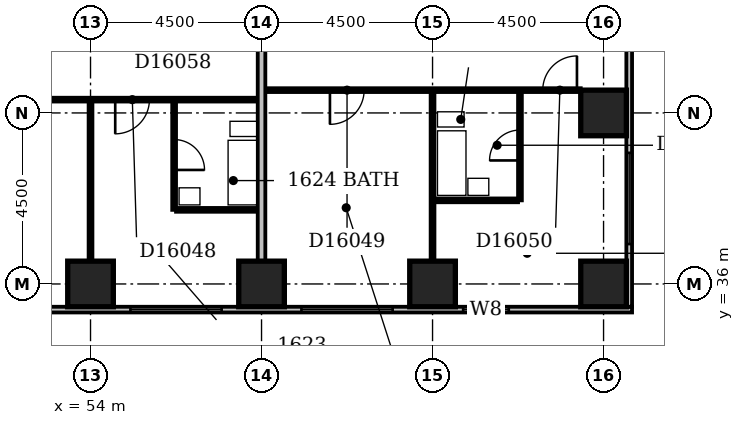
"""IFC4 building model, lengths in metres.
Left out: names, types, materials, properties, quantities, classifications, styles, units other than length and angle.
Written with IfcOpenShell. Run it as: python <this file> out.ifc"""

import sys

from ifc_helpers import new_model, si_unit, direction, frame, frame_2d, origin, origin_2d, place, context, subcontext, project, spatial, rectangle, extrude, element, fill, save


model = new_model("IFC4")
c1 = context("Model", 3, precision=1e-05, world=origin(), true_north=direction((0.0, 1.0)))
c2 = subcontext(c1, "Body", "Model", "MODEL_VIEW")
j1 = project(units=[si_unit("LENGTHUNIT", "METRE"), si_unit("PLANEANGLEUNIT", "RADIAN")], contexts=[c1])
p1 = place(None, origin())
s1 = spatial("IfcSite", under=j1, at=p1, CompositionType="ELEMENT")
p2 = place(p1, origin())
s2 = spatial("IfcBuilding", under=s1, at=p2, CompositionType="ELEMENT")
p3 = place(p2, frame((0.0, 0.0, 68.6)))
s3 = spatial("IfcBuildingStorey", under=s2, at=p3, CompositionType="ELEMENT", Elevation=68.6)
for number, where, z_axis, x_axis in (
    (1, (54.0, 36.0, -0.3), (0.0, 0.0, 1.0), (1.0, 0.0, 0.0)),
    (2, (58.5, 36.0, -0.3), (0.0, 0.0, 1.0), (1.0, 0.0, 0.0)),
    (3, (63.0, 36.0, -0.3), (0.0, 0.0, 1.0), (1.0, 0.0, 0.0)),
    (4, (67.5, 36.0, -0.3), (0.0, 0.0, 1.0), (1.0, 0.0, 0.0)),
    (5, (67.5, 40.5, -0.3), (0.0, 0.0, 1.0), (1.0, 0.0, 0.0)),
):
    element("IfcColumn", number, at=place(p3, frame(where, z_axis=z_axis, x_axis=x_axis)), inside=s3, PredefinedType="COLUMN", context=c2, shape_type="SweptSolid", body=[
        extrude(rectangle(XDim=1.2, YDim=1.2, at=origin_2d()), origin(), (0.0, 0.0, 1.0), 3.6),
    ])
p4 = place(p3, frame((23.1, 35.325, 0.0), z_axis=(0.0, 0.0, 1.0), x_axis=(1.0, 0.0, 0.0)))
e6 = element("IfcWall", 6, at=p4, inside=s3, PredefinedType="STANDARD", context=c2, shape_type="SweptSolid", body=[
    extrude(rectangle(XDim=45.15, YDim=0.15, at=frame_2d((22.575, 0.0))), origin(), (0.0, 0.0, 1.0), 2.7),
])
p5 = place(p4, frame((0.45, 0.0, 0.6)))
e7 = element("IfcOpeningElement", 7, at=p5, cuts=e6, PredefinedType="OPENING", context=c2, shape_type="SweptSolid", body=[
    extrude(rectangle(XDim=2.4, YDim=1.8, at=frame_2d((1.2, 0.9))), frame((0.0, 0.087, 0.0), z_axis=(0.0, -1.0, 0.0), x_axis=(1.0, 0.0, 0.0)), (0.0, 0.0, 1.0), 0.174),
])
p6 = place(p4, frame((4.95, 0.0, 0.6)))
e8 = element("IfcOpeningElement", 8, at=p6, cuts=e6, PredefinedType="OPENING", context=c2, shape_type="SweptSolid", body=[
    extrude(rectangle(XDim=2.4, YDim=1.8, at=frame_2d((1.2, 0.9))), frame((0.0, 0.087, 0.0), z_axis=(0.0, -1.0, 0.0), x_axis=(1.0, 0.0, 0.0)), (0.0, 0.0, 1.0), 0.174),
])
p7 = place(p4, frame((9.243, 0.0, 0.6)))
e9 = element("IfcOpeningElement", 9, at=p7, cuts=e6, PredefinedType="OPENING", context=c2, shape_type="SweptSolid", body=[
    extrude(rectangle(XDim=1.8, YDim=1.8, at=frame_2d((0.9, 0.9))), frame((0.0, 0.087, 0.0), z_axis=(0.0, -1.0, 0.0), x_axis=(1.0, 0.0, 0.0)), (0.0, 0.0, 1.0), 0.174),
])
p8 = place(p4, frame((14.97, 0.0, 0.6)))
e10 = element("IfcOpeningElement", 10, at=p8, cuts=e6, PredefinedType="OPENING", context=c2, shape_type="SweptSolid", body=[
    extrude(rectangle(XDim=1.5, YDim=1.8, at=frame_2d((0.75, 0.9))), frame((0.0, 0.087, 0.0), z_axis=(0.0, -1.0, 0.0), x_axis=(1.0, 0.0, 0.0)), (0.0, 0.0, 1.0), 0.174),
])
p9 = place(p4, frame((18.45, 0.0, 0.6)))
e11 = element("IfcOpeningElement", 11, at=p9, cuts=e6, PredefinedType="OPENING", context=c2, shape_type="SweptSolid", body=[
    extrude(rectangle(XDim=2.4, YDim=1.8, at=frame_2d((1.2, 0.9))), frame((0.0, 0.087, 0.0), z_axis=(0.0, -1.0, 0.0), x_axis=(1.0, 0.0, 0.0)), (0.0, 0.0, 1.0), 0.174),
])
p10 = place(p4, frame((22.95, 0.0, 0.6)))
e12 = element("IfcOpeningElement", 12, at=p10, cuts=e6, PredefinedType="OPENING", context=c2, shape_type="SweptSolid", body=[
    extrude(rectangle(XDim=2.4, YDim=1.8, at=frame_2d((1.2, 0.9))), frame((0.0, 0.087, 0.0), z_axis=(0.0, -1.0, 0.0), x_axis=(1.0, 0.0, 0.0)), (0.0, 0.0, 1.0), 0.174),
])
p11 = place(p4, frame((27.45, 0.0, 0.6)))
e13 = element("IfcOpeningElement", 13, at=p11, cuts=e6, PredefinedType="OPENING", context=c2, shape_type="SweptSolid", body=[
    extrude(rectangle(XDim=2.4, YDim=1.8, at=frame_2d((1.2, 0.9))), frame((0.0, 0.087, 0.0), z_axis=(0.0, -1.0, 0.0), x_axis=(1.0, 0.0, 0.0)), (0.0, 0.0, 1.0), 0.174),
])
p12 = place(p4, frame((31.95, 0.0, 0.6)))
e14 = element("IfcOpeningElement", 14, at=p12, cuts=e6, PredefinedType="OPENING", context=c2, shape_type="SweptSolid", body=[
    extrude(rectangle(XDim=2.4, YDim=1.8, at=frame_2d((1.2, 0.9))), frame((0.0, 0.087, 0.0), z_axis=(0.0, -1.0, 0.0), x_axis=(1.0, 0.0, 0.0)), (0.0, 0.0, 1.0), 0.174),
])
p13 = place(p4, frame((36.45, 0.0, 0.6)))
e15 = element("IfcOpeningElement", 15, at=p13, cuts=e6, PredefinedType="OPENING", context=c2, shape_type="SweptSolid", body=[
    extrude(rectangle(XDim=2.4, YDim=1.8, at=frame_2d((1.2, 0.9))), frame((0.0, 0.087, 0.0), z_axis=(0.0, -1.0, 0.0), x_axis=(1.0, 0.0, 0.0)), (0.0, 0.0, 1.0), 0.174),
])
p14 = place(p4, frame((40.706, 0.0, 0.6)))
e16 = element("IfcOpeningElement", 16, at=p14, cuts=e6, PredefinedType="OPENING", context=c2, shape_type="SweptSolid", body=[
    extrude(rectangle(XDim=1.2, YDim=1.8, at=frame_2d((0.6, 0.9))), frame((0.0, 0.087, 0.0), z_axis=(0.0, -1.0, 0.0), x_axis=(1.0, 0.0, 0.0)), (0.0, 0.0, 1.0), 0.174),
])
p15 = place(p3, frame((68.175, 35.4, 0.0), z_axis=(0.0, 0.0, 1.0), x_axis=(0.0, 1.0, 0.0)))
e17 = element("IfcWall", 17, at=p15, inside=s3, PredefinedType="STANDARD", context=c2, shape_type="SweptSolid", body=[
    extrude(rectangle(XDim=23.85, YDim=0.15, at=frame_2d((11.925, 0.0))), origin(), (0.0, 0.0, 1.0), 2.7),
])
p16 = place(p15, frame((1.65, 0.0, 0.6)))
e18 = element("IfcOpeningElement", 18, at=p16, cuts=e17, PredefinedType="OPENING", context=c2, shape_type="SweptSolid", body=[
    extrude(rectangle(XDim=2.4, YDim=1.8, at=frame_2d((1.2, 0.9))), frame((0.0, 0.087, 0.0), z_axis=(0.0, -1.0, 0.0), x_axis=(1.0, 0.0, 0.0)), (0.0, 0.0, 1.0), 0.174),
])
p17 = place(p15, frame((10.53, 0.0, 0.6)))
e19 = element("IfcOpeningElement", 19, at=p17, cuts=e17, PredefinedType="OPENING", context=c2, shape_type="SweptSolid", body=[
    extrude(rectangle(XDim=1.5, YDim=1.8, at=frame_2d((0.75, 0.9))), frame((0.0, 0.087, 0.0), z_axis=(0.0, -1.0, 0.0), x_axis=(1.0, 0.0, 0.0)), (0.0, 0.0, 1.0), 0.174),
])
p18 = place(p15, frame((19.65, 0.0, 0.6)))
e20 = element("IfcOpeningElement", 20, at=p18, cuts=e17, PredefinedType="OPENING", context=c2, shape_type="SweptSolid", body=[
    extrude(rectangle(XDim=2.4, YDim=1.8, at=frame_2d((1.2, 0.9))), frame((0.0, 0.087, 0.0), z_axis=(0.0, -1.0, 0.0), x_axis=(1.0, 0.0, 0.0)), (0.0, 0.0, 1.0), 0.174),
])
p19 = place(p3, frame((54.0, 36.6, 0.0), z_axis=(0.0, 0.0, 1.0), x_axis=(0.0, 1.0, 0.0)))
e21 = element("IfcWall", 21, at=p19, inside=s3, PredefinedType="PARTITIONING", context=c2, shape_type="SweptSolid", body=[
    extrude(rectangle(XDim=4.2, YDim=0.1, at=frame_2d((2.1, 0.0))), origin(), (0.0, 0.0, 1.0), 2.6),
])
p20 = place(p3, frame((58.5, 36.6, 0.0), z_axis=(0.0, 0.0, 1.0), x_axis=(0.0, 1.0, 0.0)))
e22 = element("IfcWall", 22, at=p20, inside=s3, PredefinedType="PARTITIONING", context=c2, shape_type="SweptSolid", body=[
    extrude(rectangle(XDim=12.8, YDim=0.2, at=frame_2d((6.4, 0.0))), origin(), (0.0, 0.0, 1.0), 3.3),
])
p21 = place(p3, frame((63.0, 36.6, 0.0), z_axis=(0.0, 0.0, 1.0), x_axis=(0.0, 1.0, 0.0)))
e23 = element("IfcWall", 23, at=p21, inside=s3, PredefinedType="PARTITIONING", context=c2, shape_type="SweptSolid", body=[
    extrude(rectangle(XDim=4.45, YDim=0.1, at=frame_2d((2.225, 0.0))), origin(), (0.0, 0.0, 1.0), 2.4),
])
p22 = place(p3, frame((56.2, 37.95, 0.0), z_axis=(0.0, 0.0, 1.0), x_axis=(0.0, 1.0, 0.0)))
e24 = element("IfcWall", 24, at=p22, inside=s3, PredefinedType="PLUMBINGWALL", context=c2, shape_type="SweptSolid", body=[
    extrude(rectangle(XDim=2.85, YDim=0.1, at=frame_2d((1.425, 0.0))), origin(), (0.0, 0.0, 1.0), 3.3),
])
p23 = place(p22, frame((1.05, 0.0, 0.0)))
e25 = element("IfcOpeningElement", 25, at=p23, cuts=e24, PredefinedType="OPENING", context=c2, shape_type="SweptSolid", body=[
    extrude(rectangle(XDim=0.8, YDim=2.1, at=frame_2d((0.4, 1.05))), frame((0.0, 0.062, 0.0), z_axis=(0.0, -1.0, 0.0), x_axis=(1.0, 0.0, 0.0)), (0.0, 0.0, 1.0), 0.124),
])
p24 = place(p3, frame((56.25, 37.95, 0.0), z_axis=(0.0, 0.0, 1.0), x_axis=(1.0, 0.0, 0.0)))
e26 = element("IfcWall", 26, at=p24, inside=s3, PredefinedType="PLUMBINGWALL", context=c2, shape_type="SweptSolid", body=[
    extrude(rectangle(XDim=2.15, YDim=0.1, at=frame_2d((1.075, 0.0))), origin(), (0.0, 0.0, 1.0), 3.3),
])
p25 = place(p3, frame((63.05, 38.2, 0.0), z_axis=(0.0, 0.0, 1.0), x_axis=(1.0, 0.0, 0.0)))
e27 = element("IfcWall", 27, at=p25, inside=s3, PredefinedType="PLUMBINGWALL", context=c2, shape_type="SweptSolid", body=[
    extrude(rectangle(XDim=2.2, YDim=0.1, at=frame_2d((1.1, 0.0))), origin(), (0.0, 0.0, 1.0), 3.3),
])
p26 = place(p3, frame((65.3, 38.2, 0.0), z_axis=(0.0, 0.0, 1.0), x_axis=(0.0, 1.0, 0.0)))
e28 = element("IfcWall", 28, at=p26, inside=s3, PredefinedType="PLUMBINGWALL", context=c2, shape_type="SweptSolid", body=[
    extrude(rectangle(XDim=2.85, YDim=0.1, at=frame_2d((1.425, 0.0))), origin(), (0.0, 0.0, 1.0), 3.3),
])
p27 = place(p26, frame((1.05, 0.0, 0.0)))
e29 = element("IfcOpeningElement", 29, at=p27, cuts=e28, PredefinedType="OPENING", context=c2, shape_type="SweptSolid", body=[
    extrude(rectangle(XDim=0.8, YDim=2.1, at=frame_2d((0.4, 1.05))), frame((0.0, 0.062, 0.0), z_axis=(0.0, -1.0, 0.0), x_axis=(1.0, 0.0, 0.0)), (0.0, 0.0, 1.0), 0.124),
])
p28 = place(p3, frame((49.6, 40.85, 0.0), z_axis=(0.0, 0.0, 1.0), x_axis=(1.0, 0.0, 0.0)))
e30 = element("IfcWall", 30, at=p28, inside=s3, PredefinedType="PARTITIONING", context=c2, shape_type="SweptSolid", body=[
    extrude(rectangle(XDim=8.8, YDim=0.1, at=frame_2d((4.4, 0.0))), origin(), (0.0, 0.0, 1.0), 3.3),
])
p29 = place(p28, frame((1.7, 0.0, 0.0)))
e31 = element("IfcOpeningElement", 31, at=p29, cuts=e30, PredefinedType="OPENING", context=c2, shape_type="SweptSolid", body=[
    extrude(rectangle(XDim=0.9, YDim=2.1, at=frame_2d((0.45, 1.05))), frame((0.0, 0.062, 0.0), z_axis=(0.0, -1.0, 0.0), x_axis=(1.0, 0.0, 0.0)), (0.0, 0.0, 1.0), 0.124),
])
p30 = place(p28, frame((5.05, 0.0, 0.0)))
e32 = element("IfcOpeningElement", 32, at=p30, cuts=e30, PredefinedType="OPENING", context=c2, shape_type="SweptSolid", body=[
    extrude(rectangle(XDim=0.9, YDim=2.1, at=frame_2d((0.45, 1.05))), frame((0.0, 0.062, 0.0), z_axis=(0.0, -1.0, 0.0), x_axis=(1.0, 0.0, 0.0)), (0.0, 0.0, 1.0), 0.124),
])
p31 = place(p3, frame((58.6, 41.1, 0.0), z_axis=(0.0, 0.0, 1.0), x_axis=(1.0, 0.0, 0.0)))
e33 = element("IfcWall", 33, at=p31, inside=s3, PredefinedType="PARTITIONING", context=c2, shape_type="SweptSolid", body=[
    extrude(rectangle(XDim=8.3, YDim=0.1, at=frame_2d((4.15, 0.0))), origin(), (0.0, 0.0, 1.0), 3.3),
])
p32 = place(p31, frame((1.7, 0.0, 0.0)))
e34 = element("IfcOpeningElement", 34, at=p32, cuts=e33, PredefinedType="OPENING", context=c2, shape_type="SweptSolid", body=[
    extrude(rectangle(XDim=0.9, YDim=2.1, at=frame_2d((0.45, 1.05))), frame((0.0, 0.062, 0.0), z_axis=(0.0, -1.0, 0.0), x_axis=(1.0, 0.0, 0.0)), (0.0, 0.0, 1.0), 0.124),
])
p33 = place(p31, frame((7.3, 0.0, 0.0)))
e35 = element("IfcOpeningElement", 35, at=p33, cuts=e33, PredefinedType="OPENING", context=c2, shape_type="SweptSolid", body=[
    extrude(rectangle(XDim=0.9, YDim=2.1, at=frame_2d((0.45, 1.05))), frame((0.0, 0.062, 0.0), z_axis=(0.0, -1.0, 0.0), x_axis=(1.0, 0.0, 0.0)), (0.0, 0.0, 1.0), 0.124),
])
p34 = place(p12, origin())
e36 = element("IfcWindow", 36, at=p34, inside=s3, PartitioningType="SINGLE_PANEL", PredefinedType="WINDOW", context=c2, shape_type="SweptSolid", body=[
    extrude(rectangle(XDim=2.4, YDim=1.8, at=frame_2d((1.2, 0.9))), frame((0.0, 0.03, 0.0), z_axis=(0.0, -1.0, 0.0), x_axis=(1.0, 0.0, 0.0)), (0.0, 0.0, 1.0), 0.06),
])
fill(e14, e36)
p35 = place(p13, origin())
e37 = element("IfcWindow", 37, at=p35, inside=s3, PartitioningType="SINGLE_PANEL", PredefinedType="WINDOW", context=c2, shape_type="SweptSolid", body=[
    extrude(rectangle(XDim=2.4, YDim=1.8, at=frame_2d((1.2, 0.9))), frame((0.0, 0.03, 0.0), z_axis=(0.0, -1.0, 0.0), x_axis=(1.0, 0.0, 0.0)), (0.0, 0.0, 1.0), 0.06),
])
fill(e15, e37)
p36 = place(p14, origin())
e38 = element("IfcWindow", 38, at=p36, inside=s3, PartitioningType="SINGLE_PANEL", PredefinedType="WINDOW", context=c2, shape_type="SweptSolid", body=[
    extrude(rectangle(XDim=1.2, YDim=1.8, at=frame_2d((0.6, 0.9))), frame((0.0, 0.03, 0.0), z_axis=(0.0, -1.0, 0.0), x_axis=(1.0, 0.0, 0.0)), (0.0, 0.0, 1.0), 0.06),
])
fill(e16, e38)
p37 = place(p16, origin())
e39 = element("IfcWindow", 39, at=p37, inside=s3, PartitioningType="SINGLE_PANEL", PredefinedType="WINDOW", context=c2, shape_type="SweptSolid", body=[
    extrude(rectangle(XDim=2.4, YDim=1.8, at=frame_2d((1.2, 0.9))), frame((0.0, 0.03, 0.0), z_axis=(0.0, -1.0, 0.0), x_axis=(1.0, 0.0, 0.0)), (0.0, 0.0, 1.0), 0.06),
])
fill(e18, e39)
p38 = place(p23, frame((0.8, 0.0, 0.0), z_axis=(0.0, 0.0, 1.0), x_axis=(-1.0, 0.0, 0.0)))
e40 = element("IfcDoor", 40, at=p38, inside=s3, OperationType="SINGLE_SWING_RIGHT", PredefinedType="DOOR", context=c2, shape_type="SweptSolid", body=[
    extrude(rectangle(XDim=0.8, YDim=2.1, at=frame_2d((0.4, 1.05))), frame((0.0, 0.025, 0.0), z_axis=(0.0, -1.0, 0.0), x_axis=(1.0, 0.0, 0.0)), (0.0, 0.0, 1.0), 0.05),
])
fill(e25, e40)
p39 = place(p27, origin())
e41 = element("IfcDoor", 41, at=p39, inside=s3, OperationType="SINGLE_SWING_LEFT", PredefinedType="DOOR", context=c2, shape_type="SweptSolid", body=[
    extrude(rectangle(XDim=0.8, YDim=2.1, at=frame_2d((0.4, 1.05))), frame((0.0, 0.025, 0.0), z_axis=(0.0, -1.0, 0.0), x_axis=(1.0, 0.0, 0.0)), (0.0, 0.0, 1.0), 0.05),
])
fill(e29, e41)
p40 = place(p30, frame((0.9, 0.0, 0.0), z_axis=(0.0, 0.0, 1.0), x_axis=(-1.0, 0.0, 0.0)))
e42 = element("IfcDoor", 42, at=p40, inside=s3, OperationType="SINGLE_SWING_RIGHT", PredefinedType="DOOR", context=c2, shape_type="SweptSolid", body=[
    extrude(rectangle(XDim=0.9, YDim=2.1, at=frame_2d((0.45, 1.05))), frame((0.0, 0.025, 0.0), z_axis=(0.0, -1.0, 0.0), x_axis=(1.0, 0.0, 0.0)), (0.0, 0.0, 1.0), 0.05),
])
fill(e32, e42)
p41 = place(p32, frame((0.9, 0.0, 0.0), z_axis=(0.0, 0.0, 1.0), x_axis=(-1.0, 0.0, 0.0)))
e43 = element("IfcDoor", 43, at=p41, inside=s3, OperationType="SINGLE_SWING_RIGHT", PredefinedType="DOOR", context=c2, shape_type="SweptSolid", body=[
    extrude(rectangle(XDim=0.9, YDim=2.1, at=frame_2d((0.45, 1.05))), frame((0.0, 0.025, 0.0), z_axis=(0.0, -1.0, 0.0), x_axis=(1.0, 0.0, 0.0)), (0.0, 0.0, 1.0), 0.05),
])
fill(e34, e43)
p42 = place(p33, frame((0.9, 0.0, 0.0), z_axis=(0.0, 0.0, 1.0), x_axis=(-1.0, 0.0, 0.0)))
e44 = element("IfcDoor", 44, at=p42, inside=s3, OperationType="SINGLE_SWING_LEFT", PredefinedType="DOOR", context=c2, shape_type="SweptSolid", body=[
    extrude(rectangle(XDim=0.9, YDim=2.1, at=frame_2d((0.45, 1.05))), frame((0.0, 0.025, 0.0), z_axis=(0.0, -1.0, 0.0), x_axis=(1.0, 0.0, 0.0)), (0.0, 0.0, 1.0), 0.05),
])
fill(e35, e44)
save(model, sys.argv[1])
